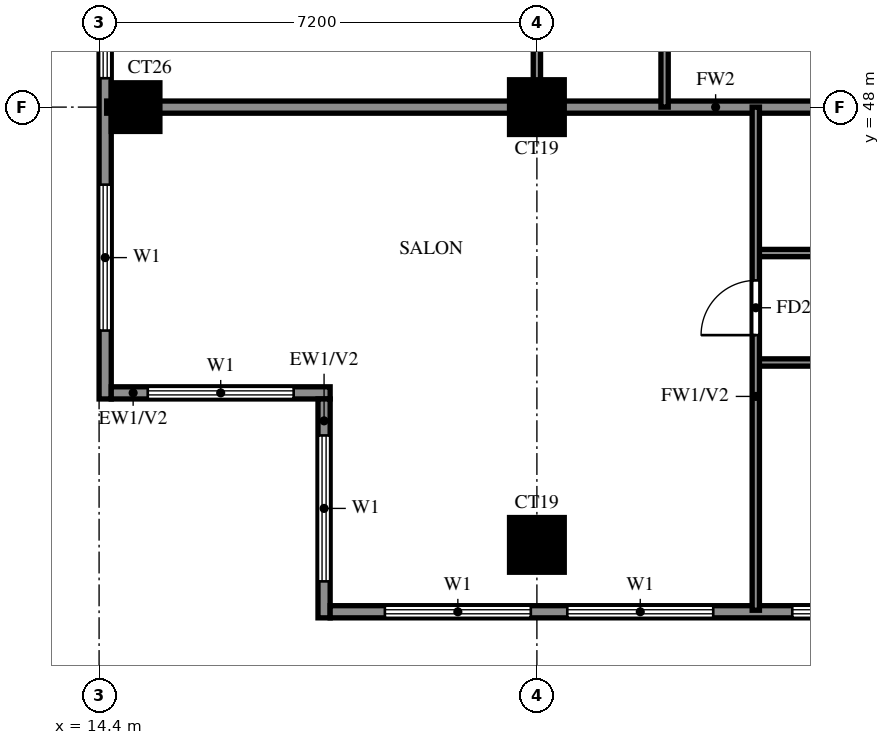
"""IFC4 building model, lengths in metres.
Left out: names, types, materials, properties, quantities, classifications, styles, units other than length and angle.
Written with IfcOpenShell. Run it as: python <this file> out.ifc"""

import sys

from ifc_helpers import new_model, si_unit, direction, frame, frame_2d, origin, origin_2d, place, context, subcontext, project, spatial, rectangle, extrude, source, transform, mapped, element, fill, save


model = new_model("IFC4")
c1 = context("Model", 3, precision=1e-05, world=origin(), true_north=direction((0.0, 1.0)))
c2 = subcontext(c1, "Body", "Model", "MODEL_VIEW")
j1 = project(units=[si_unit("LENGTHUNIT", "METRE"), si_unit("PLANEANGLEUNIT", "RADIAN")], contexts=[c1])
p1 = place(None, origin())
s1 = spatial("IfcSite", under=j1, at=p1, CompositionType="ELEMENT")
p2 = place(p1, origin())
s2 = spatial("IfcBuilding", under=s1, at=p2, CompositionType="ELEMENT")
p3 = place(p2, frame((0.0, 0.0, 178.0)))
s3 = spatial("IfcBuildingStorey", under=s2, at=p3, CompositionType="ELEMENT", Elevation=178.0)
m1 = source(origin(), c2, "Body", "SweptSolid", [
    extrude(rectangle(XDim=0.9, YDim=0.9, at=origin_2d()), origin(), (0.0, 0.0, 1.0), 3.2),
])
p4 = place(p3, frame((21.6, 40.8, 0.0), z_axis=(0.0, 0.0, 1.0), x_axis=(1.0, 0.0, 0.0)))
e1 = element("IfcColumn", 1, at=p4, inside=s3, PredefinedType="COLUMN", context=c2, shape_type="MappedRepresentation", body=[
    mapped(m1, transform((0.0, 0.0, 0.0))),
])
m2 = source(origin(), c2, "Body", "SweptSolid", [
    extrude(rectangle(XDim=0.8, YDim=0.8, at=origin_2d()), origin(), (0.0, 0.0, 1.0), 3.2),
])
p5 = place(p3, frame((15.0, 48.0, 0.0), z_axis=(0.0, 0.0, 1.0), x_axis=(1.0, 0.0, 0.0)))
e2 = element("IfcColumn", 2, at=p5, inside=s3, PredefinedType="COLUMN", context=c2, shape_type="MappedRepresentation", body=[
    mapped(m2, transform((0.0, 0.0, 0.0))),
])
p6 = place(p3, frame((21.6, 48.0, 0.0), z_axis=(0.0, 0.0, 1.0), x_axis=(1.0, 0.0, 0.0)))
e3 = element("IfcColumn", 3, at=p6, inside=s3, PredefinedType="COLUMN", context=c2, shape_type="MappedRepresentation", body=[
    mapped(m1, transform((0.0, 0.0, 0.0))),
])
p7 = place(p3, frame((14.5, 76.6, 0.0), z_axis=(0.0, 0.0, 1.0), x_axis=(0.0, -1.0, 0.0)))
e4 = element("IfcWall", 4, at=p7, inside=s3, PredefinedType="SOLIDWALL", context=c2, shape_type="SweptSolid", body=[
    extrude(rectangle(XDim=33.4, YDim=0.2, at=frame_2d((16.7, 0.0))), origin(), (0.0, 0.0, 1.0), 3.2),
])
p8 = place(p7, frame((7.9, 0.0, 0.0)))
e5 = element("IfcOpeningElement", 5, at=p8, cuts=e4, PredefinedType="OPENING", context=c2, shape_type="SweptSolid", body=[
    extrude(rectangle(XDim=1.8, YDim=2.4, at=frame_2d((0.9, 1.2))), frame((0.0, 0.11, 0.0), z_axis=(0.0, -1.0, 0.0), x_axis=(1.0, 0.0, 0.0)), (0.0, 0.0, 1.0), 0.22),
])
p9 = place(p7, frame((22.3, 0.0, 0.0)))
e6 = element("IfcOpeningElement", 6, at=p9, cuts=e4, PredefinedType="OPENING", context=c2, shape_type="SweptSolid", body=[
    extrude(rectangle(XDim=1.8, YDim=2.4, at=frame_2d((0.9, 1.2))), frame((0.0, 0.11, 0.0), z_axis=(0.0, -1.0, 0.0), x_axis=(1.0, 0.0, 0.0)), (0.0, 0.0, 1.0), 0.22),
])
p10 = place(p7, frame((29.875, 0.0, 0.6)))
e7 = element("IfcOpeningElement", 7, at=p10, cuts=e4, PredefinedType="OPENING", context=c2, shape_type="SweptSolid", body=[
    extrude(rectangle(XDim=2.4, YDim=2.4, at=frame_2d((1.2, 1.2))), frame((0.0, 0.11, 0.0), z_axis=(0.0, -1.0, 0.0), x_axis=(1.0, 0.0, 0.0)), (0.0, 0.0, 1.0), 0.22),
])
p11 = place(p7, frame((26.325, 0.0, 0.6)))
e8 = element("IfcOpeningElement", 8, at=p11, cuts=e4, PredefinedType="OPENING", context=c2, shape_type="SweptSolid", body=[
    extrude(rectangle(XDim=1.8, YDim=2.4, at=frame_2d((0.9, 1.2))), frame((0.0, 0.11, 0.0), z_axis=(0.0, -1.0, 0.0), x_axis=(1.0, 0.0, 0.0)), (0.0, 0.0, 1.0), 0.22),
])
p12 = place(p7, frame((17.95, 0.0, 0.6)))
e9 = element("IfcOpeningElement", 9, at=p12, cuts=e4, PredefinedType="OPENING", context=c2, shape_type="SweptSolid", body=[
    extrude(rectangle(XDim=0.9, YDim=2.4, at=frame_2d((0.45, 1.2))), frame((0.0, 0.11, 0.0), z_axis=(0.0, -1.0, 0.0), x_axis=(1.0, 0.0, 0.0)), (0.0, 0.0, 1.0), 0.22),
])
p13 = place(p7, frame((19.725, 0.0, 0.6)))
e10 = element("IfcOpeningElement", 10, at=p13, cuts=e4, PredefinedType="OPENING", context=c2, shape_type="SweptSolid", body=[
    extrude(rectangle(XDim=1.2, YDim=2.4, at=frame_2d((0.6, 1.2))), frame((0.0, 0.11, 0.0), z_axis=(0.0, -1.0, 0.0), x_axis=(1.0, 0.0, 0.0)), (0.0, 0.0, 1.0), 0.22),
])
p14 = place(p7, frame((14.975, 0.0, 0.6)))
e11 = element("IfcOpeningElement", 11, at=p14, cuts=e4, PredefinedType="OPENING", context=c2, shape_type="SweptSolid", body=[
    extrude(rectangle(XDim=2.4, YDim=2.4, at=frame_2d((1.2, 1.2))), frame((0.0, 0.11, 0.0), z_axis=(0.0, -1.0, 0.0), x_axis=(1.0, 0.0, 0.0)), (0.0, 0.0, 1.0), 0.22),
])
p15 = place(p7, frame((10.15, 0.0, 0.6)))
e12 = element("IfcOpeningElement", 12, at=p15, cuts=e4, PredefinedType="OPENING", context=c2, shape_type="SweptSolid", body=[
    extrude(rectangle(XDim=0.9, YDim=2.4, at=frame_2d((0.45, 1.2))), frame((0.0, 0.11, 0.0), z_axis=(0.0, -1.0, 0.0), x_axis=(1.0, 0.0, 0.0)), (0.0, 0.0, 1.0), 0.22),
])
p16 = place(p7, frame((11.925, 0.0, 0.6)))
e13 = element("IfcOpeningElement", 13, at=p16, cuts=e4, PredefinedType="OPENING", context=c2, shape_type="SweptSolid", body=[
    extrude(rectangle(XDim=1.8, YDim=2.4, at=frame_2d((0.9, 1.2))), frame((0.0, 0.11, 0.0), z_axis=(0.0, -1.0, 0.0), x_axis=(1.0, 0.0, 0.0)), (0.0, 0.0, 1.0), 0.22),
])
p17 = place(p7, frame((3.55, 0.0, 1.5)))
e14 = element("IfcOpeningElement", 14, at=p17, cuts=e4, PredefinedType="OPENING", context=c2, shape_type="SweptSolid", body=[
    extrude(rectangle(XDim=0.9, YDim=0.9, at=frame_2d((0.45, 0.45))), frame((0.0, 0.11, 0.0), z_axis=(0.0, -1.0, 0.0), x_axis=(1.0, 0.0, 0.0)), (0.0, 0.0, 1.0), 0.22),
])
p18 = place(p7, frame((5.475, 0.0, 1.5)))
e15 = element("IfcOpeningElement", 15, at=p18, cuts=e4, PredefinedType="OPENING", context=c2, shape_type="SweptSolid", body=[
    extrude(rectangle(XDim=0.9, YDim=0.9, at=frame_2d((0.45, 0.45))), frame((0.0, 0.11, 0.0), z_axis=(0.0, -1.0, 0.0), x_axis=(1.0, 0.0, 0.0)), (0.0, 0.0, 1.0), 0.22),
])
p19 = place(p7, frame((0.6, 0.0, 0.6)))
e16 = element("IfcOpeningElement", 16, at=p19, cuts=e4, PredefinedType="OPENING", context=c2, shape_type="SweptSolid", body=[
    extrude(rectangle(XDim=2.4, YDim=2.4, at=frame_2d((1.2, 1.2))), frame((0.0, 0.11, 0.0), z_axis=(0.0, -1.0, 0.0), x_axis=(1.0, 0.0, 0.0)), (0.0, 0.0, 1.0), 0.22),
])
p20 = place(p3, frame((14.6, 43.3, 0.0), z_axis=(0.0, 0.0, 1.0), x_axis=(1.0, 0.0, 0.0)))
e17 = element("IfcWall", 17, at=p20, inside=s3, PredefinedType="SOLIDWALL", context=c2, shape_type="SweptSolid", body=[
    extrude(rectangle(XDim=3.6, YDim=0.2, at=frame_2d((1.8, 0.0))), origin(), (0.0, 0.0, 1.0), 3.2),
])
p21 = place(p20, frame((0.6, 0.0, 0.6)))
e18 = element("IfcOpeningElement", 18, at=p21, cuts=e17, PredefinedType="OPENING", context=c2, shape_type="SweptSolid", body=[
    extrude(rectangle(XDim=2.4, YDim=2.4, at=frame_2d((1.2, 1.2))), frame((0.0, 0.11, 0.0), z_axis=(0.0, -1.0, 0.0), x_axis=(1.0, 0.0, 0.0)), (0.0, 0.0, 1.0), 0.22),
])
p22 = place(p3, frame((18.1, 43.2, 0.0), z_axis=(0.0, 0.0, 1.0), x_axis=(0.0, -1.0, 0.0)))
e19 = element("IfcWall", 19, at=p22, inside=s3, PredefinedType="SOLIDWALL", context=c2, shape_type="SweptSolid", body=[
    extrude(rectangle(XDim=3.6, YDim=0.2, at=frame_2d((1.8, 0.0))), origin(), (0.0, 0.0, 1.0), 3.2),
])
p23 = place(p22, frame((0.6, 0.0, 0.6)))
e20 = element("IfcOpeningElement", 20, at=p23, cuts=e19, PredefinedType="OPENING", context=c2, shape_type="SweptSolid", body=[
    extrude(rectangle(XDim=2.4, YDim=2.4, at=frame_2d((1.2, 1.2))), frame((0.0, 0.11, 0.0), z_axis=(0.0, -1.0, 0.0), x_axis=(1.0, 0.0, 0.0)), (0.0, 0.0, 1.0), 0.22),
])
p24 = place(p3, frame((18.2, 39.7, 0.0), z_axis=(0.0, 0.0, 1.0), x_axis=(1.0, 0.0, 0.0)))
e21 = element("IfcWall", 21, at=p24, inside=s3, PredefinedType="SOLIDWALL", context=c2, shape_type="SweptSolid", body=[
    extrude(rectangle(XDim=23.8, YDim=0.2, at=frame_2d((11.9, 0.0))), origin(), (0.0, 0.0, 1.0), 3.2),
])
p25 = place(p24, frame((13.3, 0.0, 0.0)))
e22 = element("IfcOpeningElement", 22, at=p25, cuts=e21, PredefinedType="OPENING", context=c2, shape_type="SweptSolid", body=[
    extrude(rectangle(XDim=1.8, YDim=2.4, at=frame_2d((0.9, 1.2))), frame((0.0, 0.11, 0.0), z_axis=(0.0, -1.0, 0.0), x_axis=(1.0, 0.0, 0.0)), (0.0, 0.0, 1.0), 0.22),
])
p26 = place(p24, frame((0.9, 0.0, 0.6)))
e23 = element("IfcOpeningElement", 23, at=p26, cuts=e21, PredefinedType="OPENING", context=c2, shape_type="SweptSolid", body=[
    extrude(rectangle(XDim=2.4, YDim=2.4, at=frame_2d((1.2, 1.2))), frame((0.0, 0.11, 0.0), z_axis=(0.0, -1.0, 0.0), x_axis=(1.0, 0.0, 0.0)), (0.0, 0.0, 1.0), 0.22),
])
p27 = place(p24, frame((3.9, 0.0, 0.6)))
e24 = element("IfcOpeningElement", 24, at=p27, cuts=e21, PredefinedType="OPENING", context=c2, shape_type="SweptSolid", body=[
    extrude(rectangle(XDim=2.4, YDim=2.4, at=frame_2d((1.2, 1.2))), frame((0.0, 0.11, 0.0), z_axis=(0.0, -1.0, 0.0), x_axis=(1.0, 0.0, 0.0)), (0.0, 0.0, 1.0), 0.22),
])
p28 = place(p24, frame((7.6, 0.0, 0.6)))
e25 = element("IfcOpeningElement", 25, at=p28, cuts=e21, PredefinedType="OPENING", context=c2, shape_type="SweptSolid", body=[
    extrude(rectangle(XDim=2.4, YDim=2.4, at=frame_2d((1.2, 1.2))), frame((0.0, 0.11, 0.0), z_axis=(0.0, -1.0, 0.0), x_axis=(1.0, 0.0, 0.0)), (0.0, 0.0, 1.0), 0.22),
])
p29 = place(p24, frame((11.5, 0.0, 0.6)))
e26 = element("IfcOpeningElement", 26, at=p29, cuts=e21, PredefinedType="OPENING", context=c2, shape_type="SweptSolid", body=[
    extrude(rectangle(XDim=1.2, YDim=2.4, at=frame_2d((0.6, 1.2))), frame((0.0, 0.11, 0.0), z_axis=(0.0, -1.0, 0.0), x_axis=(1.0, 0.0, 0.0)), (0.0, 0.0, 1.0), 0.22),
])
p30 = place(p3, frame((14.525, 48.0, 0.0), z_axis=(0.0, 0.0, 1.0), x_axis=(1.0, 0.0, 0.0)))
e27 = element("IfcWall", 27, at=p30, inside=s3, PredefinedType="SOLIDWALL", context=c2, shape_type="SweptSolid", body=[
    extrude(rectangle(XDim=19.075, YDim=0.2, at=frame_2d((9.538, 0.0))), origin(), (0.0, 0.0, 1.0), 3.2),
])
p31 = place(p3, frame((25.2, 43.8, 0.0), z_axis=(0.0, 0.0, 1.0), x_axis=(1.0, 0.0, 0.0)))
e28 = element("IfcWall", 28, at=p31, inside=s3, PredefinedType="PARTITIONING", context=c2, shape_type="SweptSolid", body=[
    extrude(rectangle(XDim=8.4, YDim=0.12, at=frame_2d((4.2, 0.0))), origin(), (0.0, 0.0, 1.0), 3.2),
])
p32 = place(p31, frame((1.35, 0.0, 0.0)))
e29 = element("IfcOpeningElement", 29, at=p32, cuts=e28, PredefinedType="OPENING", context=c2, shape_type="SweptSolid", body=[
    extrude(rectangle(XDim=0.9, YDim=2.1, at=frame_2d((0.45, 1.05))), frame((0.0, 0.07, 0.0), z_axis=(0.0, -1.0, 0.0), x_axis=(1.0, 0.0, 0.0)), (0.0, 0.0, 1.0), 0.14),
])
p33 = place(p31, frame((5.55, 0.0, 0.0)))
e30 = element("IfcOpeningElement", 30, at=p33, cuts=e28, PredefinedType="OPENING", context=c2, shape_type="SweptSolid", body=[
    extrude(rectangle(XDim=0.9, YDim=2.1, at=frame_2d((0.45, 1.05))), frame((0.0, 0.07, 0.0), z_axis=(0.0, -1.0, 0.0), x_axis=(1.0, 0.0, 0.0)), (0.0, 0.0, 1.0), 0.14),
])
p34 = place(p3, frame((25.2, 45.6, 0.0), z_axis=(0.0, 0.0, 1.0), x_axis=(1.0, 0.0, 0.0)))
e31 = element("IfcWall", 31, at=p34, inside=s3, PredefinedType="PARTITIONING", context=c2, shape_type="SweptSolid", body=[
    extrude(rectangle(XDim=6.0, YDim=0.12, at=frame_2d((3.0, 0.0))), origin(), (0.0, 0.0, 1.0), 3.2),
])
p35 = place(p34, frame((1.45, 0.0, 0.0)))
e32 = element("IfcOpeningElement", 32, at=p35, cuts=e31, PredefinedType="OPENING", context=c2, shape_type="SweptSolid", body=[
    extrude(rectangle(XDim=0.9, YDim=2.1, at=frame_2d((0.45, 1.05))), frame((0.0, 0.07, 0.0), z_axis=(0.0, -1.0, 0.0), x_axis=(1.0, 0.0, 0.0)), (0.0, 0.0, 1.0), 0.14),
])
p36 = place(p3, frame((21.6, 48.0, 0.0), z_axis=(0.0, 0.0, 1.0), x_axis=(0.0, 1.0, 0.0)))
e33 = element("IfcWall", 33, at=p36, inside=s3, PredefinedType="PARTITIONING", context=c2, shape_type="SweptSolid", body=[
    extrude(rectangle(XDim=21.6, YDim=0.12, at=frame_2d((10.8, 0.0))), origin(), (0.0, 0.0, 1.0), 3.2),
])
p37 = place(p36, frame((1.35, 0.0, 0.0)))
e34 = element("IfcOpeningElement", 34, at=p37, cuts=e33, PredefinedType="OPENING", context=c2, shape_type="SweptSolid", body=[
    extrude(rectangle(XDim=0.9, YDim=2.1, at=frame_2d((0.45, 1.05))), frame((0.0, 0.07, 0.0), z_axis=(0.0, -1.0, 0.0), x_axis=(1.0, 0.0, 0.0)), (0.0, 0.0, 1.0), 0.14),
])
p38 = place(p36, frame((7.95, 0.0, 0.0)))
e35 = element("IfcOpeningElement", 35, at=p38, cuts=e33, PredefinedType="OPENING", context=c2, shape_type="SweptSolid", body=[
    extrude(rectangle(XDim=1.5, YDim=2.1, at=frame_2d((0.75, 1.05))), frame((0.0, 0.07, 0.0), z_axis=(0.0, -1.0, 0.0), x_axis=(1.0, 0.0, 0.0)), (0.0, 0.0, 1.0), 0.14),
])
p39 = place(p36, frame((12.15, 0.0, 0.0)))
e36 = element("IfcOpeningElement", 36, at=p39, cuts=e33, PredefinedType="OPENING", context=c2, shape_type="SweptSolid", body=[
    extrude(rectangle(XDim=0.9, YDim=2.1, at=frame_2d((0.45, 1.05))), frame((0.0, 0.07, 0.0), z_axis=(0.0, -1.0, 0.0), x_axis=(1.0, 0.0, 0.0)), (0.0, 0.0, 1.0), 0.14),
])
p40 = place(p36, frame((17.55, 0.0, 0.0)))
e37 = element("IfcOpeningElement", 37, at=p40, cuts=e33, PredefinedType="OPENING", context=c2, shape_type="SweptSolid", body=[
    extrude(rectangle(XDim=0.9, YDim=2.1, at=frame_2d((0.45, 1.05))), frame((0.0, 0.07, 0.0), z_axis=(0.0, -1.0, 0.0), x_axis=(1.0, 0.0, 0.0)), (0.0, 0.0, 1.0), 0.14),
])
p41 = place(p3, frame((23.7, 48.0, 0.0), z_axis=(0.0, 0.0, 1.0), x_axis=(0.0, 1.0, 0.0)))
e38 = element("IfcWall", 38, at=p41, inside=s3, PredefinedType="PARTITIONING", context=c2, shape_type="SweptSolid", body=[
    extrude(rectangle(XDim=3.6, YDim=0.12, at=frame_2d((1.8, 0.0))), origin(), (0.0, 0.0, 1.0), 3.2),
])
p42 = place(p3, frame((25.2, 39.725, 0.0), z_axis=(0.0, 0.0, 1.0), x_axis=(0.0, 1.0, 0.0)))
e39 = element("IfcWall", 39, at=p42, inside=s3, PredefinedType="PARTITIONING", context=c2, shape_type="SweptSolid", body=[
    extrude(rectangle(XDim=8.275, YDim=0.12, at=frame_2d((4.137, 0.0))), origin(), (0.0, 0.0, 1.0), 3.2),
])
p43 = place(p42, frame((4.525, 0.0, 0.0)))
e40 = element("IfcOpeningElement", 40, at=p43, cuts=e39, PredefinedType="OPENING", context=c2, shape_type="SweptSolid", body=[
    extrude(rectangle(XDim=0.9, YDim=2.1, at=frame_2d((0.45, 1.05))), frame((0.0, 0.07, 0.0), z_axis=(0.0, -1.0, 0.0), x_axis=(1.0, 0.0, 0.0)), (0.0, 0.0, 1.0), 0.14),
])
p44 = place(p10, origin())
e41 = element("IfcWindow", 41, at=p44, inside=s3, PartitioningType="DOUBLE_PANEL_VERTICAL", PredefinedType="WINDOW", context=c2, shape_type="SweptSolid", body=[
    extrude(rectangle(XDim=2.4, YDim=2.4, at=frame_2d((1.2, 1.2))), frame((0.0, 0.03, 0.0), z_axis=(0.0, -1.0, 0.0), x_axis=(1.0, 0.0, 0.0)), (0.0, 0.0, 1.0), 0.06),
])
fill(e7, e41)
p45 = place(p11, origin())
e42 = element("IfcWindow", 42, at=p45, inside=s3, PartitioningType="DOUBLE_PANEL_VERTICAL", PredefinedType="WINDOW", context=c2, shape_type="SweptSolid", body=[
    extrude(rectangle(XDim=1.8, YDim=2.4, at=frame_2d((0.9, 1.2))), frame((0.0, 0.03, 0.0), z_axis=(0.0, -1.0, 0.0), x_axis=(1.0, 0.0, 0.0)), (0.0, 0.0, 1.0), 0.06),
])
fill(e8, e42)
p46 = place(p21, origin())
e43 = element("IfcWindow", 43, at=p46, inside=s3, PartitioningType="DOUBLE_PANEL_VERTICAL", PredefinedType="WINDOW", context=c2, shape_type="SweptSolid", body=[
    extrude(rectangle(XDim=2.4, YDim=2.4, at=frame_2d((1.2, 1.2))), frame((0.0, 0.03, 0.0), z_axis=(0.0, -1.0, 0.0), x_axis=(1.0, 0.0, 0.0)), (0.0, 0.0, 1.0), 0.06),
])
fill(e18, e43)
p47 = place(p23, origin())
e44 = element("IfcWindow", 44, at=p47, inside=s3, PartitioningType="DOUBLE_PANEL_VERTICAL", PredefinedType="WINDOW", context=c2, shape_type="SweptSolid", body=[
    extrude(rectangle(XDim=2.4, YDim=2.4, at=frame_2d((1.2, 1.2))), frame((0.0, 0.03, 0.0), z_axis=(0.0, -1.0, 0.0), x_axis=(1.0, 0.0, 0.0)), (0.0, 0.0, 1.0), 0.06),
])
fill(e20, e44)
p48 = place(p26, origin())
e45 = element("IfcWindow", 45, at=p48, inside=s3, PartitioningType="DOUBLE_PANEL_VERTICAL", PredefinedType="WINDOW", context=c2, shape_type="SweptSolid", body=[
    extrude(rectangle(XDim=2.4, YDim=2.4, at=frame_2d((1.2, 1.2))), frame((0.0, 0.03, 0.0), z_axis=(0.0, -1.0, 0.0), x_axis=(1.0, 0.0, 0.0)), (0.0, 0.0, 1.0), 0.06),
])
fill(e23, e45)
p49 = place(p27, origin())
e46 = element("IfcWindow", 46, at=p49, inside=s3, PartitioningType="DOUBLE_PANEL_VERTICAL", PredefinedType="WINDOW", context=c2, shape_type="SweptSolid", body=[
    extrude(rectangle(XDim=2.4, YDim=2.4, at=frame_2d((1.2, 1.2))), frame((0.0, 0.03, 0.0), z_axis=(0.0, -1.0, 0.0), x_axis=(1.0, 0.0, 0.0)), (0.0, 0.0, 1.0), 0.06),
])
fill(e24, e46)
p50 = place(p28, origin())
e47 = element("IfcWindow", 47, at=p50, inside=s3, PartitioningType="DOUBLE_PANEL_VERTICAL", PredefinedType="WINDOW", context=c2, shape_type="SweptSolid", body=[
    extrude(rectangle(XDim=2.4, YDim=2.4, at=frame_2d((1.2, 1.2))), frame((0.0, 0.03, 0.0), z_axis=(0.0, -1.0, 0.0), x_axis=(1.0, 0.0, 0.0)), (0.0, 0.0, 1.0), 0.06),
])
fill(e25, e47)
p51 = place(p43, origin())
e48 = element("IfcDoor", 48, at=p51, inside=s3, OperationType="SINGLE_SWING_RIGHT", PredefinedType="DOOR", context=c2, shape_type="SweptSolid", body=[
    extrude(rectangle(XDim=0.9, YDim=2.1, at=frame_2d((0.45, 1.05))), frame((0.0, 0.025, 0.0), z_axis=(0.0, -1.0, 0.0), x_axis=(1.0, 0.0, 0.0)), (0.0, 0.0, 1.0), 0.05),
])
fill(e40, e48)
save(model, sys.argv[1])
